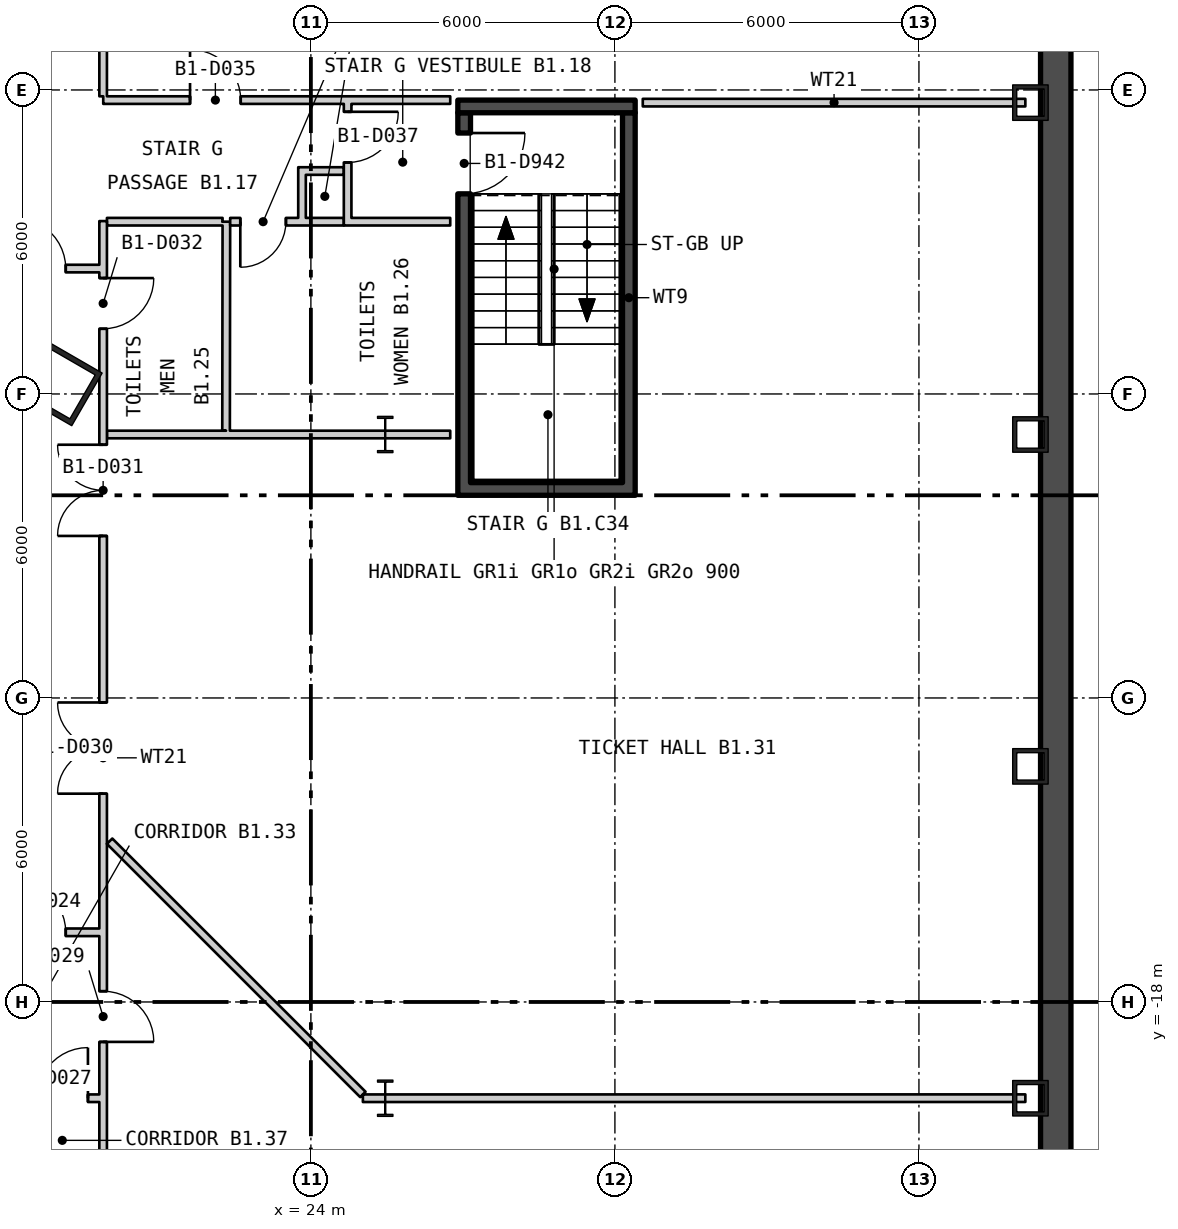
"""IFC4 building model, lengths in metres.
Left out: names, types, materials, properties, quantities, classifications, styles, units other than length and angle.
Written with IfcOpenShell. Run it as: python <this file> out.ifc"""

import sys

from ifc_helpers import new_model, si_unit, direction, frame, frame_2d, origin, origin_2d, place, context, subcontext, project, spatial, rectangle, hollow_rectangle, i_section, extrude, element, fill, save


model = new_model("IFC4")
c1 = context("Model", 3, precision=1e-05, world=origin(), true_north=direction((0.0, 1.0)))
c2 = subcontext(c1, "Body", "Model", "MODEL_VIEW")
j1 = project(units=[si_unit("LENGTHUNIT", "METRE"), si_unit("PLANEANGLEUNIT", "RADIAN")], contexts=[c1])
p1 = place(None, origin())
s1 = spatial("IfcSite", under=j1, at=p1, CompositionType="ELEMENT")
p2 = place(p1, origin())
s2 = spatial("IfcBuilding", under=s1, at=p2, CompositionType="ELEMENT")
p3 = place(p2, frame((0.0, 0.0, -5.7)))
s3 = spatial("IfcBuildingStorey", under=s2, at=p3, CompositionType="ELEMENT", Elevation=-5.7)
p4 = place(p3, frame((19.061, -5.807, 0.0), z_axis=(0.0, 0.0, 1.0), x_axis=(0.5, 0.866025403784, 0.0)))
e1 = element("IfcColumn", 1, at=p4, inside=s3, PredefinedType="COLUMN", context=c2, shape_type="SweptSolid", body=[
    extrude(hollow_rectangle(XDim=1.2, YDim=1.2, WallThickness=0.1, at=origin_2d()), origin(), (0.0, 0.0, 1.0), 5.7),
])
for number, where, z_axis, x_axis in (
    (2, (38.2, -19.9, 0.0), (0.0, 0.0, 1.0), (0.0, 1.0, 0.0)),
    (3, (38.2, -13.35, 0.0), (0.0, 0.0, 1.0), (0.0, 1.0, 0.0)),
    (4, (38.2, -6.8, 0.0), (0.0, 0.0, 1.0), (0.0, 1.0, 0.0)),
    (5, (38.2, -0.25, 0.0), (0.0, 0.0, 1.0), (0.0, 1.0, 0.0)),
):
    element("IfcColumn", number, at=place(p3, frame(where, z_axis=z_axis, x_axis=x_axis)), inside=s3, PredefinedType="COLUMN", context=c2, shape_type="SweptSolid", body=[
        extrude(hollow_rectangle(XDim=0.7, YDim=0.7, WallThickness=0.08, at=origin_2d()), origin(), (0.0, 0.0, 1.0), 5.7),
    ])
for number, where, z_axis, x_axis in (
    (6, (25.467, -6.8, 0.0), (0.0, 0.0, 1.0), (1.0, 0.0, 0.0)),
    (7, (25.467, -19.9, 0.0), (0.0, 0.0, 1.0), (1.0, 0.0, 0.0)),
):
    element("IfcColumn", number, at=place(p3, frame(where, z_axis=z_axis, x_axis=x_axis)), inside=s3, PredefinedType="COLUMN", context=c2, shape_type="SweptSolid", body=[
        extrude(i_section(OverallWidth=0.304, OverallDepth=0.716, WebThickness=0.021, FlangeThickness=0.04, at=origin_2d()), origin(), (0.0, 0.0, 1.0), 5.7),
    ])
p5 = place(p3, frame((38.7, -33.2, -0.4), z_axis=(0.0, 0.0, 1.0), x_axis=(0.0, 1.0, 0.0)))
e8 = element("IfcWall", 8, at=p5, inside=s3, PredefinedType="STANDARD", context=c2, shape_type="SweptSolid", body=[
    extrude(rectangle(XDim=52.8, YDim=0.6, at=frame_2d((26.4, 0.0))), origin(), (0.0, 0.0, 1.0), 5.7),
])
p6 = place(p3, frame((27.025, -7.75, 0.0), z_axis=(0.0, 0.0, 1.0), x_axis=(0.0, 1.0, 0.0)))
e9 = element("IfcWall", 9, at=p6, inside=s3, PredefinedType="SHEAR", context=c2, shape_type="SweptSolid", body=[
    extrude(rectangle(XDim=7.3, YDim=0.25, at=frame_2d((3.65, 0.0))), origin(), (0.0, 0.0, 1.0), 5.25),
])
p7 = place(p6, frame((5.7, 0.0, 0.0)))
e10 = element("IfcOpeningElement", 10, at=p7, cuts=e9, PredefinedType="OPENING", context=c2, shape_type="SweptSolid", body=[
    extrude(rectangle(XDim=1.2, YDim=2.1, at=frame_2d((0.6, 1.05))), frame((0.0, 0.135, 0.0), z_axis=(0.0, -1.0, 0.0), x_axis=(1.0, 0.0, 0.0)), (0.0, 0.0, 1.0), 0.27),
])
p8 = place(p3, frame((30.275, -7.75, 0.0), z_axis=(0.0, 0.0, 1.0), x_axis=(0.0, 1.0, 0.0)))
e11 = element("IfcWall", 11, at=p8, inside=s3, PredefinedType="SHEAR", context=c2, shape_type="SweptSolid", body=[
    extrude(rectangle(XDim=7.3, YDim=0.25, at=frame_2d((3.65, 0.0))), origin(), (0.0, 0.0, 1.0), 5.25),
])
for number, where, z_axis, x_axis in (
    (12, (26.9, -7.875, 0.0), (0.0, 0.0, 1.0), (1.0, 0.0, 0.0)),
    (13, (26.9, -0.325, 0.0), (0.0, 0.0, 1.0), (1.0, 0.0, 0.0)),
):
    element("IfcWall", number, at=place(p3, frame(where, z_axis=z_axis, x_axis=x_axis)), inside=s3, PredefinedType="SHEAR", context=c2, shape_type="SweptSolid", body=[
        extrude(rectangle(XDim=3.5, YDim=0.25, at=frame_2d((1.75, 0.0))), origin(), (0.0, 0.0, 1.0), 5.25),
    ])
p9 = place(p3, frame((17.5, -16.625, 0.0), z_axis=(0.0, 0.0, 1.0), x_axis=(1.0, 0.0, 0.0)))
e14 = element("IfcWall", 14, at=p9, inside=s3, PredefinedType="PARTITIONING", context=c2, shape_type="SweptSolid", body=[
    extrude(rectangle(XDim=2.325, YDim=0.15, at=frame_2d((1.163, 0.0))), origin(), (0.0, 0.0, 1.0), 5.25),
])
p10 = place(p9, frame((0.662, 0.0, 0.0)))
e15 = element("IfcOpeningElement", 15, at=p10, cuts=e14, PredefinedType="OPENING", context=c2, shape_type="SweptSolid", body=[
    extrude(rectangle(XDim=1.0, YDim=2.1, at=frame_2d((0.5, 1.05))), frame((0.0, 0.085, 0.0), z_axis=(0.0, -1.0, 0.0), x_axis=(1.0, 0.0, 0.0)), (0.0, 0.0, 1.0), 0.17),
])
p11 = place(p3, frame((17.5, -3.525, 0.0), z_axis=(0.0, 0.0, 1.0), x_axis=(1.0, 0.0, 0.0)))
e16 = element("IfcWall", 16, at=p11, inside=s3, PredefinedType="PARTITIONING", context=c2, shape_type="SweptSolid", body=[
    extrude(rectangle(XDim=2.325, YDim=0.15, at=frame_2d((1.163, 0.0))), origin(), (0.0, 0.0, 1.0), 5.25),
])
p12 = place(p11, frame((0.662, 0.0, 0.0)))
e17 = element("IfcOpeningElement", 17, at=p12, cuts=e16, PredefinedType="OPENING", context=c2, shape_type="SweptSolid", body=[
    extrude(rectangle(XDim=1.0, YDim=2.1, at=frame_2d((0.5, 1.05))), frame((0.0, 0.085, 0.0), z_axis=(0.0, -1.0, 0.0), x_axis=(1.0, 0.0, 0.0)), (0.0, 0.0, 1.0), 0.17),
])
p13 = place(p3, frame((18.375, -19.9, 0.0), z_axis=(0.0, 0.0, 1.0), x_axis=(1.0, 0.0, 0.0)))
e18 = element("IfcWall", 18, at=p13, inside=s3, PredefinedType="PARTITIONING", context=c2, shape_type="SweptSolid", body=[
    extrude(rectangle(XDim=1.45, YDim=0.15, at=frame_2d((0.725, 0.0))), origin(), (0.0, 0.0, 1.0), 5.25),
])
p14 = place(p13, frame((0.225, 0.0, 0.0)))
e19 = element("IfcOpeningElement", 19, at=p14, cuts=e18, PredefinedType="OPENING", context=c2, shape_type="SweptSolid", body=[
    extrude(rectangle(XDim=1.0, YDim=2.1, at=frame_2d((0.5, 1.05))), frame((0.0, 0.085, 0.0), z_axis=(0.0, -1.0, 0.0), x_axis=(1.0, 0.0, 0.0)), (0.0, 0.0, 1.0), 0.17),
])
p15 = place(p3, frame((19.9, -23.775, 0.0), z_axis=(0.0, 0.0, 1.0), x_axis=(0.0, 1.0, 0.0)))
e20 = element("IfcWall", 20, at=p15, inside=s3, PredefinedType="PARTITIONING", context=c2, shape_type="SweptSolid", body=[
    extrude(rectangle(XDim=21.187, YDim=0.15, at=frame_2d((10.594, 0.0))), origin(), (0.0, 0.0, 1.0), 5.25),
])
p16 = place(p15, frame((4.987, 0.0, 0.0)))
e21 = element("IfcOpeningElement", 21, at=p16, cuts=e20, PredefinedType="OPENING", context=c2, shape_type="SweptSolid", body=[
    extrude(rectangle(XDim=1.0, YDim=2.1, at=frame_2d((0.5, 1.05))), frame((0.0, 0.085, 0.0), z_axis=(0.0, -1.0, 0.0), x_axis=(1.0, 0.0, 0.0)), (0.0, 0.0, 1.0), 0.17),
])
p17 = place(p15, frame((9.886, 0.0, 0.0)))
e22 = element("IfcOpeningElement", 22, at=p17, cuts=e20, PredefinedType="OPENING", context=c2, shape_type="SweptSolid", body=[
    extrude(rectangle(XDim=1.8, YDim=2.1, at=frame_2d((0.9, 1.05))), frame((0.0, 0.085, 0.0), z_axis=(0.0, -1.0, 0.0), x_axis=(1.0, 0.0, 0.0)), (0.0, 0.0, 1.0), 0.17),
])
p18 = place(p15, frame((14.973, 0.0, 0.0)))
e23 = element("IfcOpeningElement", 23, at=p18, cuts=e20, PredefinedType="OPENING", context=c2, shape_type="SweptSolid", body=[
    extrude(rectangle(XDim=1.8, YDim=2.1, at=frame_2d((0.9, 1.05))), frame((0.0, 0.085, 0.0), z_axis=(0.0, -1.0, 0.0), x_axis=(1.0, 0.0, 0.0)), (0.0, 0.0, 1.0), 0.17),
])
p19 = place(p15, frame((19.062, 0.0, 0.0)))
e24 = element("IfcOpeningElement", 24, at=p19, cuts=e20, PredefinedType="OPENING", context=c2, shape_type="SweptSolid", body=[
    extrude(rectangle(XDim=1.0, YDim=2.1, at=frame_2d((0.5, 1.05))), frame((0.0, 0.085, 0.0), z_axis=(0.0, -1.0, 0.0), x_axis=(1.0, 0.0, 0.0)), (0.0, 0.0, 1.0), 0.17),
])
p20 = place(p3, frame((19.9, -0.125, 0.0), z_axis=(0.0, 0.0, 1.0), x_axis=(0.0, 1.0, 0.0)))
e25 = element("IfcWall", 25, at=p20, inside=s3, PredefinedType="PARTITIONING", context=c2, shape_type="SweptSolid", body=[
    extrude(rectangle(XDim=1.15, YDim=0.15, at=frame_2d((0.575, 0.0))), origin(), (0.0, 0.0, 1.0), 5.25),
])
p21 = place(p3, frame((19.902, -0.2, 0.0), z_axis=(0.0, 0.0, 1.0), x_axis=(1.0, 0.0, 0.0)))
e26 = element("IfcWall", 26, at=p21, inside=s3, PredefinedType="PARTITIONING", context=c2, shape_type="SweptSolid", body=[
    extrude(rectangle(XDim=6.848, YDim=0.15, at=frame_2d((3.424, 0.0))), origin(), (0.0, 0.0, 1.0), 5.25),
])
p22 = place(p21, frame((1.713, 0.0, 0.0)))
e27 = element("IfcOpeningElement", 27, at=p22, cuts=e26, PredefinedType="OPENING", context=c2, shape_type="SweptSolid", body=[
    extrude(rectangle(XDim=1.0, YDim=2.1, at=frame_2d((0.5, 1.05))), frame((0.0, 0.085, 0.0), z_axis=(0.0, -1.0, 0.0), x_axis=(1.0, 0.0, 0.0)), (0.0, 0.0, 1.0), 0.17),
])
p23 = place(p3, frame((19.975, -6.8, 0.0), z_axis=(0.0, 0.0, 1.0), x_axis=(1.0, 0.0, 0.0)))
e28 = element("IfcWall", 28, at=p23, inside=s3, PredefinedType="PARTITIONING", context=c2, shape_type="SweptSolid", body=[
    extrude(rectangle(XDim=6.775, YDim=0.15, at=frame_2d((3.388, 0.0))), origin(), (0.0, 0.0, 1.0), 5.25),
])
p24 = place(p3, frame((19.975, -2.6, 0.0), z_axis=(0.0, 0.0, 1.0), x_axis=(1.0, 0.0, 0.0)))
e29 = element("IfcWall", 29, at=p24, inside=s3, PredefinedType="PARTITIONING", context=c2, shape_type="SweptSolid", body=[
    extrude(rectangle(XDim=2.282, YDim=0.15, at=frame_2d((1.141, 0.0))), origin(), (0.0, 0.0, 1.0), 5.25),
])
p25 = place(p3, frame((20.028, -14.827, 0.0), z_axis=(0.0, 0.0, 1.0), x_axis=(0.707106781187, -0.707106781187, 0.0)))
e30 = element("IfcWall", 30, at=p25, inside=s3, PredefinedType="PARTITIONING", context=c2, shape_type="SweptSolid", body=[
    extrude(rectangle(XDim=7.068, YDim=0.15, at=frame_2d((3.534, 0.0))), origin(), (0.0, 0.0, 1.0), 5.25),
])
p26 = place(p3, frame((22.326, -6.725, 0.0), z_axis=(0.0, 0.0, 1.0), x_axis=(0.001454543916, 0.99999894215, 0.0)))
e31 = element("IfcWall", 31, at=p26, inside=s3, PredefinedType="PARTITIONING", context=c2, shape_type="SweptSolid", body=[
    extrude(rectangle(XDim=4.125, YDim=0.15, at=frame_2d((2.062, 0.0))), origin(), (0.0, 0.0, 1.0), 5.25),
])
p27 = place(p3, frame((22.407, -2.6, 0.0), z_axis=(0.0, 0.0, 1.0), x_axis=(1.0, 0.0, 0.0)))
e32 = element("IfcWall", 32, at=p27, inside=s3, PredefinedType="PARTITIONING", context=c2, shape_type="SweptSolid", body=[
    extrude(rectangle(XDim=1.343, YDim=0.15, at=frame_2d((0.671, 0.0))), origin(), (0.0, 0.0, 1.0), 5.25),
])
p28 = place(p27, frame((0.2, 0.0, 0.0)))
e33 = element("IfcOpeningElement", 33, at=p28, cuts=e32, PredefinedType="OPENING", context=c2, shape_type="SweptSolid", body=[
    extrude(rectangle(XDim=0.9, YDim=2.1, at=frame_2d((0.45, 1.05))), frame((0.0, 0.085, 0.0), z_axis=(0.0, -1.0, 0.0), x_axis=(1.0, 0.0, 0.0)), (0.0, 0.0, 1.0), 0.17),
])
p29 = place(p3, frame((23.825, -2.675, 0.0), z_axis=(0.0, 0.0, 1.0), x_axis=(0.0, 1.0, 0.0)))
e34 = element("IfcWall", 34, at=p29, inside=s3, PredefinedType="PARTITIONING", context=c2, shape_type="SweptSolid", body=[
    extrude(rectangle(XDim=1.15, YDim=0.15, at=frame_2d((0.575, 0.0))), origin(), (0.0, 0.0, 1.0), 5.25),
])
for number, where, z_axis, x_axis in (
    (35, (23.9, -2.6, 0.0), (0.0, 0.0, 1.0), (1.0, 0.0, 0.0)),
    (36, (23.9, -1.6, 0.0), (0.0, 0.0, 1.0), (1.0, 0.0, 0.0)),
):
    element("IfcWall", number, at=place(p3, frame(where, z_axis=z_axis, x_axis=x_axis)), inside=s3, PredefinedType="PARTITIONING", context=c2, shape_type="SweptSolid", body=[
        extrude(rectangle(XDim=0.75, YDim=0.15, at=frame_2d((0.375, 0.0))), origin(), (0.0, 0.0, 1.0), 5.25),
    ])
p30 = place(p3, frame((24.725, -2.675, 0.0), z_axis=(0.0, 0.0, 1.0), x_axis=(0.0, 1.0, 0.0)))
e37 = element("IfcWall", 37, at=p30, inside=s3, PredefinedType="PARTITIONING", context=c2, shape_type="SweptSolid", body=[
    extrude(rectangle(XDim=1.087, YDim=0.15, at=frame_2d((0.543, 0.0))), origin(), (0.0, 0.0, 1.0), 5.25),
])
p31 = place(p3, frame((24.725, -1.588, 0.0), z_axis=(0.0, 0.0, 1.0), x_axis=(0.0, 1.0, 0.0)))
e38 = element("IfcWall", 38, at=p31, inside=s3, PredefinedType="PARTITIONING", context=c2, shape_type="SweptSolid", body=[
    extrude(rectangle(XDim=1.313, YDim=0.15, at=frame_2d((0.656, 0.0))), origin(), (0.0, 0.0, 1.0), 5.25),
])
p32 = place(p31, frame((0.157, 0.0, 0.0)))
e39 = element("IfcOpeningElement", 39, at=p32, cuts=e38, PredefinedType="OPENING", context=c2, shape_type="SweptSolid", body=[
    extrude(rectangle(XDim=1.0, YDim=2.1, at=frame_2d((0.5, 1.05))), frame((0.0, 0.085, 0.0), z_axis=(0.0, -1.0, 0.0), x_axis=(1.0, 0.0, 0.0)), (0.0, 0.0, 1.0), 0.17),
])
p33 = place(p3, frame((24.8, -2.6, 0.0), z_axis=(0.0, 0.0, 1.0), x_axis=(1.0, 0.0, 0.0)))
e40 = element("IfcWall", 40, at=p33, inside=s3, PredefinedType="PARTITIONING", context=c2, shape_type="SweptSolid", body=[
    extrude(rectangle(XDim=1.95, YDim=0.15, at=frame_2d((0.975, 0.0))), origin(), (0.0, 0.0, 1.0), 5.25),
])
p34 = place(p3, frame((25.026, -19.9, 0.0), z_axis=(0.0, 0.0, 1.0), x_axis=(0.999999997075, 7.6487685e-05, 0.0)))
e41 = element("IfcWall", 41, at=p34, inside=s3, PredefinedType="PARTITIONING", context=c2, shape_type="SweptSolid", body=[
    extrude(rectangle(XDim=13.074, YDim=0.15, at=frame_2d((6.537, 0.0))), origin(), (0.0, 0.0, 1.0), 5.25),
])
p35 = place(p3, frame((30.55, -0.25, 0.0), z_axis=(0.0, 0.0, 1.0), x_axis=(1.0, 0.0, 0.0)))
e42 = element("IfcWall", 42, at=p35, inside=s3, PredefinedType="PARTITIONING", context=c2, shape_type="SweptSolid", body=[
    extrude(rectangle(XDim=7.55, YDim=0.15, at=frame_2d((3.775, 0.0))), origin(), (0.0, 0.0, 1.0), 5.25),
])
p36 = place(p7, origin())
e43 = element("IfcDoor", 43, at=p36, inside=s3, OperationType="SINGLE_SWING_RIGHT", PredefinedType="DOOR", context=c2, shape_type="SweptSolid", body=[
    extrude(rectangle(XDim=1.2, YDim=2.1, at=frame_2d((0.6, 1.05))), frame((0.0, 0.025, 0.0), z_axis=(0.0, -1.0, 0.0), x_axis=(1.0, 0.0, 0.0)), (0.0, 0.0, 1.0), 0.05),
])
fill(e10, e43)
p37 = place(p10, origin())
e44 = element("IfcDoor", 44, at=p37, inside=s3, OperationType="SINGLE_SWING_RIGHT", PredefinedType="DOOR", context=c2, shape_type="SweptSolid", body=[
    extrude(rectangle(XDim=1.0, YDim=2.1, at=frame_2d((0.5, 1.05))), frame((0.0, 0.025, 0.0), z_axis=(0.0, -1.0, 0.0), x_axis=(1.0, 0.0, 0.0)), (0.0, 0.0, 1.0), 0.05),
])
fill(e15, e44)
p38 = place(p12, origin())
e45 = element("IfcDoor", 45, at=p38, inside=s3, OperationType="SINGLE_SWING_RIGHT", PredefinedType="DOOR", context=c2, shape_type="SweptSolid", body=[
    extrude(rectangle(XDim=1.0, YDim=2.1, at=frame_2d((0.5, 1.05))), frame((0.0, 0.025, 0.0), z_axis=(0.0, -1.0, 0.0), x_axis=(1.0, 0.0, 0.0)), (0.0, 0.0, 1.0), 0.05),
])
fill(e17, e45)
p39 = place(p14, origin())
e46 = element("IfcDoor", 46, at=p39, inside=s3, OperationType="SINGLE_SWING_LEFT", PredefinedType="DOOR", context=c2, shape_type="SweptSolid", body=[
    extrude(rectangle(XDim=1.0, YDim=2.1, at=frame_2d((0.5, 1.05))), frame((0.0, 0.025, 0.0), z_axis=(0.0, -1.0, 0.0), x_axis=(1.0, 0.0, 0.0)), (0.0, 0.0, 1.0), 0.05),
])
fill(e19, e46)
p40 = place(p16, origin())
e47 = element("IfcDoor", 47, at=p40, inside=s3, OperationType="SINGLE_SWING_LEFT", PredefinedType="DOOR", context=c2, shape_type="SweptSolid", body=[
    extrude(rectangle(XDim=1.0, YDim=2.1, at=frame_2d((0.5, 1.05))), frame((0.0, 0.025, 0.0), z_axis=(0.0, -1.0, 0.0), x_axis=(1.0, 0.0, 0.0)), (0.0, 0.0, 1.0), 0.05),
])
fill(e21, e47)
p41 = place(p17, origin())
e48 = element("IfcDoor", 48, at=p41, inside=s3, OperationType="DOUBLE_DOOR_SINGLE_SWING", PredefinedType="DOOR", context=c2, shape_type="SweptSolid", body=[
    extrude(rectangle(XDim=1.8, YDim=2.1, at=frame_2d((0.9, 1.05))), frame((0.0, 0.025, 0.0), z_axis=(0.0, -1.0, 0.0), x_axis=(1.0, 0.0, 0.0)), (0.0, 0.0, 1.0), 0.05),
])
fill(e22, e48)
p42 = place(p18, origin())
e49 = element("IfcDoor", 49, at=p42, inside=s3, OperationType="DOUBLE_DOOR_SINGLE_SWING", PredefinedType="DOOR", context=c2, shape_type="SweptSolid", body=[
    extrude(rectangle(XDim=1.8, YDim=2.1, at=frame_2d((0.9, 1.05))), frame((0.0, 0.025, 0.0), z_axis=(0.0, -1.0, 0.0), x_axis=(1.0, 0.0, 0.0)), (0.0, 0.0, 1.0), 0.05),
])
fill(e23, e49)
p43 = place(p19, origin())
e50 = element("IfcDoor", 50, at=p43, inside=s3, OperationType="SINGLE_SWING_RIGHT", PredefinedType="DOOR", context=c2, shape_type="SweptSolid", body=[
    extrude(rectangle(XDim=1.0, YDim=2.1, at=frame_2d((0.5, 1.05))), frame((0.0, 0.025, 0.0), z_axis=(0.0, -1.0, 0.0), x_axis=(1.0, 0.0, 0.0)), (0.0, 0.0, 1.0), 0.05),
])
fill(e24, e50)
p44 = place(p22, origin())
e51 = element("IfcDoor", 51, at=p44, inside=s3, OperationType="SINGLE_SWING_RIGHT", PredefinedType="DOOR", context=c2, shape_type="SweptSolid", body=[
    extrude(rectangle(XDim=1.0, YDim=2.1, at=frame_2d((0.5, 1.05))), frame((0.0, 0.025, 0.0), z_axis=(0.0, -1.0, 0.0), x_axis=(1.0, 0.0, 0.0)), (0.0, 0.0, 1.0), 0.05),
])
fill(e27, e51)
p45 = place(p28, origin())
e52 = element("IfcDoor", 52, at=p45, inside=s3, OperationType="SINGLE_SWING_LEFT", PredefinedType="DOOR", context=c2, shape_type="SweptSolid", body=[
    extrude(rectangle(XDim=0.9, YDim=2.1, at=frame_2d((0.45, 1.05))), frame((0.0, 0.025, 0.0), z_axis=(0.0, -1.0, 0.0), x_axis=(1.0, 0.0, 0.0)), (0.0, 0.0, 1.0), 0.05),
])
fill(e33, e52)
p46 = place(p32, origin())
e53 = element("IfcDoor", 53, at=p46, inside=s3, OperationType="SINGLE_SWING_RIGHT", PredefinedType="DOOR", context=c2, shape_type="SweptSolid", body=[
    extrude(rectangle(XDim=1.0, YDim=2.1, at=frame_2d((0.5, 1.05))), frame((0.0, 0.025, 0.0), z_axis=(0.0, -1.0, 0.0), x_axis=(1.0, 0.0, 0.0)), (0.0, 0.0, 1.0), 0.05),
])
fill(e39, e53)
save(model, sys.argv[1])
